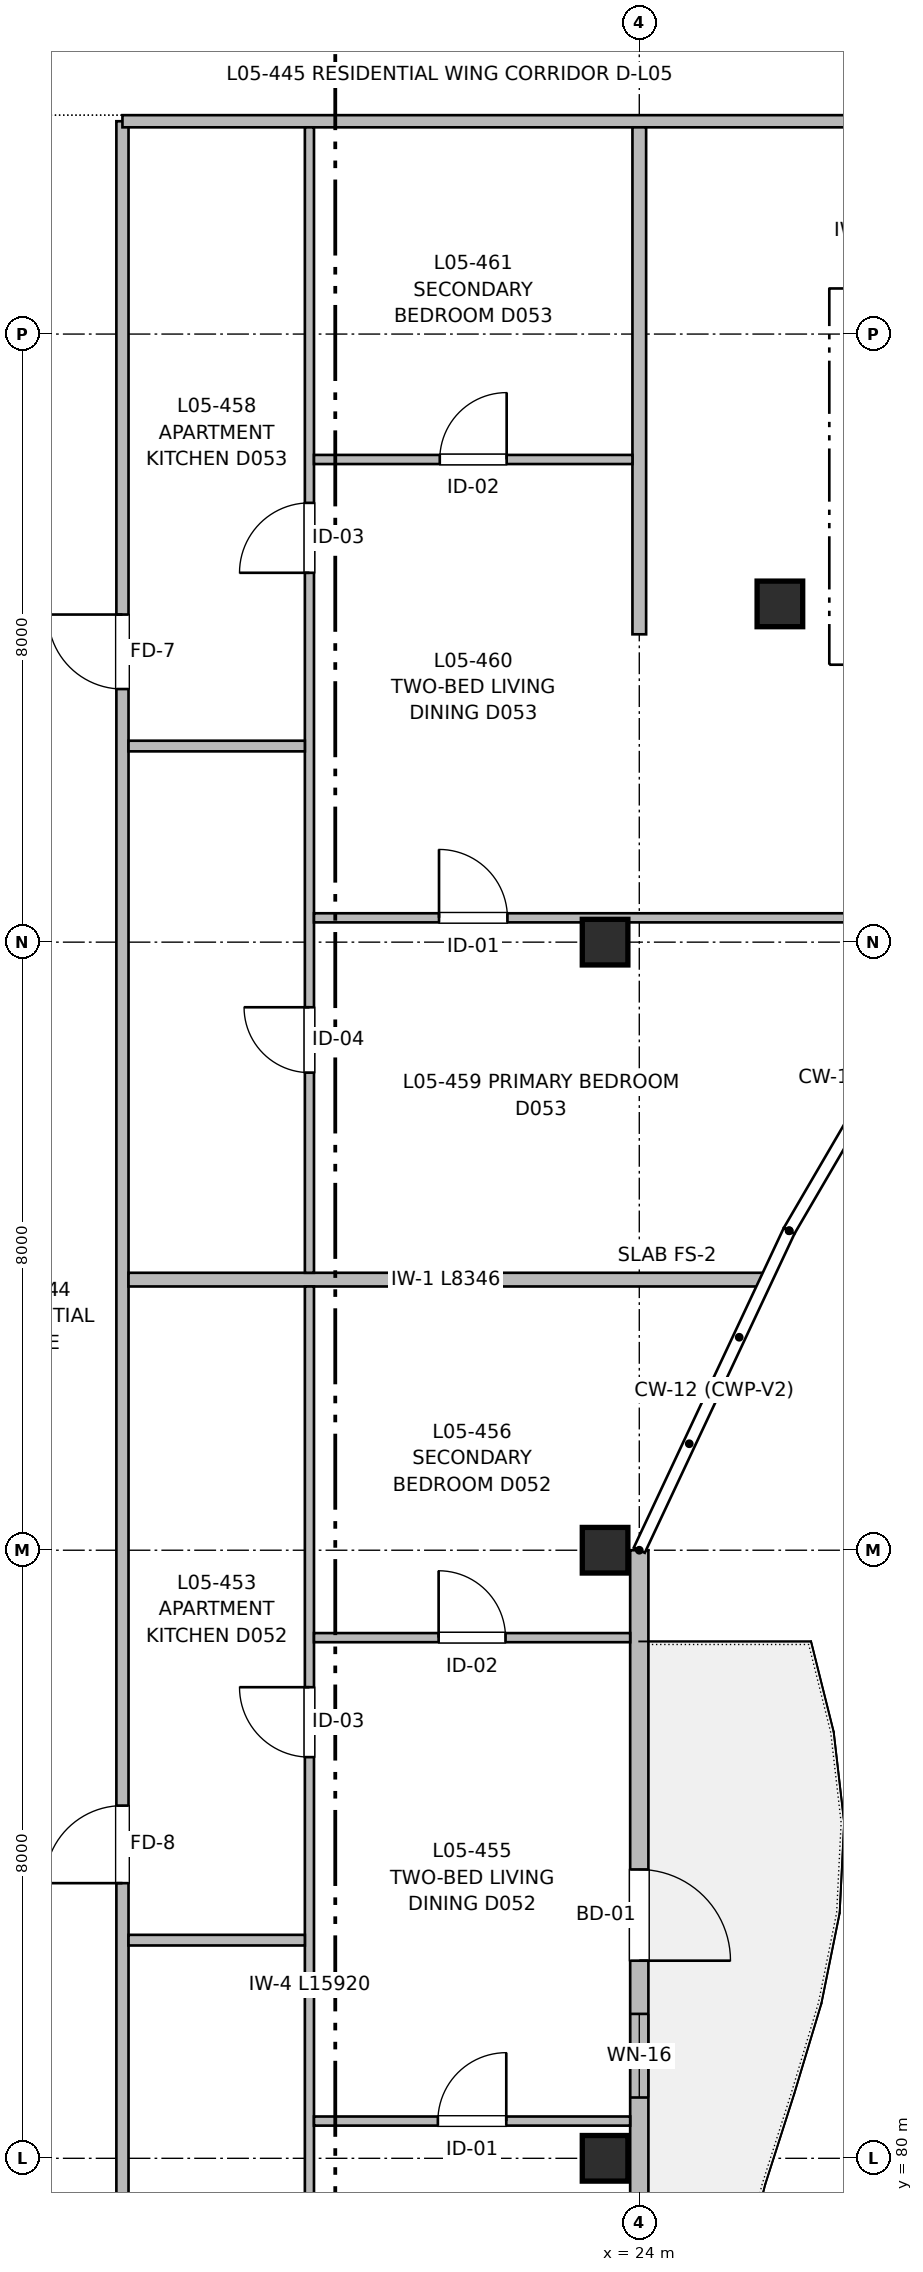
"""IFC4 building model, lengths in metres.
Left out: names, types, materials, properties, quantities, classifications, styles, units other than length and angle.
Written with IfcOpenShell. Run it as: python <this file> out.ifc"""

import sys

from ifc_helpers import new_model, si_unit, direction, frame, frame_2d, origin, origin_2d, place, context, subcontext, project, spatial, rectangle, extrude, element, fill, save


model = new_model("IFC4")
c1 = context("Model", 3, precision=1e-05, world=origin(), true_north=direction((0.0, 1.0)))
c2 = subcontext(c1, "Body", "Model", "MODEL_VIEW")
j1 = project(units=[si_unit("LENGTHUNIT", "METRE"), si_unit("PLANEANGLEUNIT", "RADIAN")], contexts=[c1])
p1 = place(None, origin())
s1 = spatial("IfcSite", under=j1, at=p1, CompositionType="ELEMENT")
p2 = place(p1, origin())
s2 = spatial("IfcBuilding", under=s1, at=p2, CompositionType="ELEMENT")
p3 = place(p2, frame((0.0, 0.0, 16.96)))
s3 = spatial("IfcBuildingStorey", under=s2, at=p3, CompositionType="ELEMENT", Elevation=16.96)
for number, where, z_axis, x_axis in (
    (1, (23.55, 80.0, 0.0), (0.0, 0.0, 1.0), (1.0, 0.0, 0.0)),
    (2, (23.55, 88.0, 0.0), (0.0, 0.0, 1.0), (1.0, 0.0, 0.0)),
    (3, (23.55, 96.0, 0.0), (0.0, 0.0, 1.0), (1.0, 0.0, 0.0)),
    (4, (25.85, 100.45, 0.0), (0.0, 0.0, 1.0), (1.0, 0.0, 0.0)),
):
    element("IfcColumn", number, at=place(p3, frame(where, z_axis=z_axis, x_axis=x_axis)), inside=s3, PredefinedType="COLUMN", context=c2, shape_type="SweptSolid", body=[
        extrude(rectangle(XDim=0.6, YDim=0.6, at=origin_2d()), origin(), (0.0, 0.0, 1.0), 3.2),
    ])
p4 = place(p3, frame((24.0, 88.0, 0.0), z_axis=(0.0, 0.0, 1.0), x_axis=(0.0, -1.0, 0.0)))
e5 = element("IfcWall", 5, at=p4, inside=s3, PredefinedType="SOLIDWALL", context=c2, shape_type="SweptSolid", body=[
    extrude(rectangle(XDim=28.8, YDim=0.24, at=frame_2d((14.4, 0.0))), origin(), (0.0, 0.0, 1.0), 2.98),
])
p5 = place(p4, frame((4.2, 0.0, 0.0)))
e6 = element("IfcOpeningElement", 6, at=p5, cuts=e5, PredefinedType="OPENING", context=c2, shape_type="SweptSolid", body=[
    extrude(rectangle(XDim=1.2, YDim=2.2, at=frame_2d((0.6, 1.1))), frame((0.0, 0.13, 0.0), z_axis=(0.0, -1.0, 0.0), x_axis=(1.0, 0.0, 0.0)), (0.0, 0.0, 1.0), 0.26),
])
p6 = place(p4, frame((6.1, 0.0, 0.62)))
e7 = element("IfcOpeningElement", 7, at=p6, cuts=e5, PredefinedType="OPENING", context=c2, shape_type="SweptSolid", body=[
    extrude(rectangle(XDim=1.1, YDim=1.6, at=frame_2d((0.55, 0.8))), frame((0.0, 0.13, 0.0), z_axis=(0.0, -1.0, 0.0), x_axis=(1.0, 0.0, 0.0)), (0.0, 0.0, 1.0), 0.26),
])
p7 = place(p4, frame((13.275, 0.0, 0.72)))
e8 = element("IfcOpeningElement", 8, at=p7, cuts=e5, PredefinedType="OPENING", context=c2, shape_type="SweptSolid", body=[
    extrude(rectangle(XDim=2.25, YDim=1.5, at=frame_2d((1.125, 0.75))), frame((0.0, 0.13, 0.0), z_axis=(0.0, -1.0, 0.0), x_axis=(1.0, 0.0, 0.0)), (0.0, 0.0, 1.0), 0.26),
])
p8 = place(p4, frame((24.775, 0.0, 0.9)))
e9 = element("IfcOpeningElement", 9, at=p8, cuts=e5, PredefinedType="OPENING", context=c2, shape_type="SweptSolid", body=[
    extrude(rectangle(XDim=1.05, YDim=1.15, at=frame_2d((0.525, 0.575))), frame((0.0, 0.13, 0.0), z_axis=(0.0, -1.0, 0.0), x_axis=(1.0, 0.0, 0.0)), (0.0, 0.0, 1.0), 0.26),
])
p9 = place(p4, frame((19.725, 0.0, 0.82)))
e10 = element("IfcOpeningElement", 10, at=p9, cuts=e5, PredefinedType="OPENING", context=c2, shape_type="SweptSolid", body=[
    extrude(rectangle(XDim=1.5, YDim=1.4, at=frame_2d((0.75, 0.7))), frame((0.0, 0.13, 0.0), z_axis=(0.0, -1.0, 0.0), x_axis=(1.0, 0.0, 0.0)), (0.0, 0.0, 1.0), 0.26),
])
p10 = place(p4, frame((9.255, 0.0, 0.82)))
e11 = element("IfcOpeningElement", 11, at=p10, cuts=e5, PredefinedType="OPENING", context=c2, shape_type="SweptSolid", body=[
    extrude(rectangle(XDim=1.5, YDim=1.4, at=frame_2d((0.75, 0.7))), frame((0.0, 0.13, 0.0), z_axis=(0.0, -1.0, 0.0), x_axis=(1.0, 0.0, 0.0)), (0.0, 0.0, 1.0), 0.26),
])
p11 = place(p3, frame((17.2, 59.36, 0.0), z_axis=(0.0, 0.0, 1.0), x_axis=(0.0, 1.0, 0.0)))
e12 = element("IfcWall", 12, at=p11, inside=s3, PredefinedType="PARTITIONING", context=c2, shape_type="SweptSolid", body=[
    extrude(rectangle(XDim=47.44, YDim=0.16, at=frame_2d((23.72, 0.0))), origin(), (0.0, 0.0, 1.0), 2.935),
])
p12 = place(p11, frame((8.11, 0.0, 0.0)))
e13 = element("IfcOpeningElement", 13, at=p12, cuts=e12, PredefinedType="OPENING", context=c2, shape_type="SweptSolid", body=[
    extrude(rectangle(XDim=0.98, YDim=2.15, at=frame_2d((0.49, 1.075))), frame((0.0, 0.09, 0.0), z_axis=(0.0, -1.0, 0.0), x_axis=(1.0, 0.0, 0.0)), (0.0, 0.0, 1.0), 0.18),
])
p13 = place(p11, frame((24.26, 0.0, 0.0)))
e14 = element("IfcOpeningElement", 14, at=p13, cuts=e12, PredefinedType="OPENING", context=c2, shape_type="SweptSolid", body=[
    extrude(rectangle(XDim=1.02, YDim=2.15, at=frame_2d((0.51, 1.075))), frame((0.0, 0.09, 0.0), z_axis=(0.0, -1.0, 0.0), x_axis=(1.0, 0.0, 0.0)), (0.0, 0.0, 1.0), 0.18),
])
p14 = place(p11, frame((39.97, 0.0, 0.0)))
e15 = element("IfcOpeningElement", 15, at=p14, cuts=e12, PredefinedType="OPENING", context=c2, shape_type="SweptSolid", body=[
    extrude(rectangle(XDim=0.98, YDim=2.15, at=frame_2d((0.49, 1.075))), frame((0.0, 0.09, 0.0), z_axis=(0.0, -1.0, 0.0), x_axis=(1.0, 0.0, 0.0)), (0.0, 0.0, 1.0), 0.18),
])
p15 = place(p3, frame((17.2, 106.8, 0.0), z_axis=(0.0, 0.0, 1.0), x_axis=(1.0, 0.0, 0.0)))
e16 = element("IfcWall", 16, at=p15, inside=s3, PredefinedType="PARTITIONING", context=c2, shape_type="SweptSolid", body=[
    extrude(rectangle(XDim=17.64, YDim=0.16, at=frame_2d((8.82, 0.0))), origin(), (0.0, 0.0, 1.0), 2.935),
])
p16 = place(p15, frame((13.075, 0.0, 0.0)))
e17 = element("IfcOpeningElement", 17, at=p16, cuts=e16, PredefinedType="OPENING", context=c2, shape_type="SweptSolid", body=[
    extrude(rectangle(XDim=1.05, YDim=2.15, at=frame_2d((0.525, 1.075))), frame((0.0, 0.09, 0.0), z_axis=(0.0, -1.0, 0.0), x_axis=(1.0, 0.0, 0.0)), (0.0, 0.0, 1.0), 0.18),
])
p17 = place(p3, frame((24.0, 100.05, 0.0), z_axis=(0.0, 0.0, 1.0), x_axis=(0.0, 1.0, 0.0)))
e18 = element("IfcWall", 18, at=p17, inside=s3, PredefinedType="PARTITIONING", context=c2, shape_type="SweptSolid", body=[
    extrude(rectangle(XDim=6.67, YDim=0.18, at=frame_2d((3.335, 0.0))), origin(), (0.0, 0.0, 1.0), 2.935),
])
p18 = place(p3, frame((17.28, 91.56, 0.0), z_axis=(0.0, 0.0, 1.0), x_axis=(1.0, 0.0, 0.0)))
e19 = element("IfcWall", 19, at=p18, inside=s3, PredefinedType="PARTITIONING", context=c2, shape_type="SweptSolid", body=[
    extrude(rectangle(XDim=8.346, YDim=0.18, at=frame_2d((4.173, 0.0))), origin(), (0.0, 0.0, 1.0), 2.935),
])
p19 = place(p3, frame((19.66, 75.55, 0.0), z_axis=(0.0, 0.0, 1.0), x_axis=(0.0, 1.0, 0.0)))
e20 = element("IfcWall", 20, at=p19, inside=s3, PredefinedType="PARTITIONING", context=c2, shape_type="SweptSolid", body=[
    extrude(rectangle(XDim=15.92, YDim=0.12, at=frame_2d((7.96, 0.0))), origin(), (0.0, 0.0, 1.0), 2.935),
])
p20 = place(p19, frame((2.781, 0.0, 0.0)))
e21 = element("IfcOpeningElement", 21, at=p20, cuts=e20, PredefinedType="OPENING", context=c2, shape_type="SweptSolid", body=[
    extrude(rectangle(XDim=0.94, YDim=2.1, at=frame_2d((0.47, 1.05))), frame((0.0, 0.07, 0.0), z_axis=(0.0, -1.0, 0.0), x_axis=(1.0, 0.0, 0.0)), (0.0, 0.0, 1.0), 0.14),
])
p21 = place(p19, frame((9.728, 0.0, 0.0)))
e22 = element("IfcOpeningElement", 22, at=p21, cuts=e20, PredefinedType="OPENING", context=c2, shape_type="SweptSolid", body=[
    extrude(rectangle(XDim=0.92, YDim=2.1, at=frame_2d((0.46, 1.05))), frame((0.0, 0.07, 0.0), z_axis=(0.0, -1.0, 0.0), x_axis=(1.0, 0.0, 0.0)), (0.0, 0.0, 1.0), 0.14),
])
p22 = place(p3, frame((17.28, 82.87, 0.0), z_axis=(0.0, 0.0, 1.0), x_axis=(1.0, 0.0, 0.0)))
e23 = element("IfcWall", 23, at=p22, inside=s3, PredefinedType="PARTITIONING", context=c2, shape_type="SweptSolid", body=[
    extrude(rectangle(XDim=2.32, YDim=0.14, at=frame_2d((1.16, 0.0))), origin(), (0.0, 0.0, 1.0), 2.935),
])
p23 = place(p3, frame((19.72, 80.49, 0.0), z_axis=(0.0, 0.0, 1.0), x_axis=(1.0, 0.0, 0.0)))
e24 = element("IfcWall", 24, at=p23, inside=s3, PredefinedType="PARTITIONING", context=c2, shape_type="SweptSolid", body=[
    extrude(rectangle(XDim=4.16, YDim=0.12, at=frame_2d((2.08, 0.0))), origin(), (0.0, 0.0, 1.0), 2.935),
])
p24 = place(p23, frame((1.63, 0.0, 0.0)))
e25 = element("IfcOpeningElement", 25, at=p24, cuts=e24, PredefinedType="OPENING", context=c2, shape_type="SweptSolid", body=[
    extrude(rectangle(XDim=0.9, YDim=2.1, at=frame_2d((0.45, 1.05))), frame((0.0, 0.07, 0.0), z_axis=(0.0, -1.0, 0.0), x_axis=(1.0, 0.0, 0.0)), (0.0, 0.0, 1.0), 0.14),
])
p25 = place(p3, frame((19.72, 86.85, 0.0), z_axis=(0.0, 0.0, 1.0), x_axis=(1.0, 0.0, 0.0)))
e26 = element("IfcWall", 26, at=p25, inside=s3, PredefinedType="PARTITIONING", context=c2, shape_type="SweptSolid", body=[
    extrude(rectangle(XDim=4.16, YDim=0.12, at=frame_2d((2.08, 0.0))), origin(), (0.0, 0.0, 1.0), 2.935),
])
p26 = place(p25, frame((1.64, 0.0, 0.0)))
e27 = element("IfcOpeningElement", 27, at=p26, cuts=e26, PredefinedType="OPENING", context=c2, shape_type="SweptSolid", body=[
    extrude(rectangle(XDim=0.88, YDim=2.1, at=frame_2d((0.44, 1.05))), frame((0.0, 0.07, 0.0), z_axis=(0.0, -1.0, 0.0), x_axis=(1.0, 0.0, 0.0)), (0.0, 0.0, 1.0), 0.14),
])
p27 = place(p3, frame((19.66, 91.65, 0.0), z_axis=(0.0, 0.0, 1.0), x_axis=(0.0, 1.0, 0.0)))
e28 = element("IfcWall", 28, at=p27, inside=s3, PredefinedType="PARTITIONING", context=c2, shape_type="SweptSolid", body=[
    extrude(rectangle(XDim=15.07, YDim=0.12, at=frame_2d((7.535, 0.0))), origin(), (0.0, 0.0, 1.0), 2.935),
])
p28 = place(p27, frame((2.633, 0.0, 0.0)))
e29 = element("IfcOpeningElement", 29, at=p28, cuts=e28, PredefinedType="OPENING", context=c2, shape_type="SweptSolid", body=[
    extrude(rectangle(XDim=0.86, YDim=2.1, at=frame_2d((0.43, 1.05))), frame((0.0, 0.07, 0.0), z_axis=(0.0, -1.0, 0.0), x_axis=(1.0, 0.0, 0.0)), (0.0, 0.0, 1.0), 0.14),
])
p29 = place(p27, frame((9.209, 0.0, 0.0)))
e30 = element("IfcOpeningElement", 30, at=p29, cuts=e28, PredefinedType="OPENING", context=c2, shape_type="SweptSolid", body=[
    extrude(rectangle(XDim=0.92, YDim=2.1, at=frame_2d((0.46, 1.05))), frame((0.0, 0.07, 0.0), z_axis=(0.0, -1.0, 0.0), x_axis=(1.0, 0.0, 0.0)), (0.0, 0.0, 1.0), 0.14),
])
p30 = place(p3, frame((17.28, 98.58, 0.0), z_axis=(0.0, 0.0, 1.0), x_axis=(1.0, 0.0, 0.0)))
e31 = element("IfcWall", 31, at=p30, inside=s3, PredefinedType="PARTITIONING", context=c2, shape_type="SweptSolid", body=[
    extrude(rectangle(XDim=2.32, YDim=0.14, at=frame_2d((1.16, 0.0))), origin(), (0.0, 0.0, 1.0), 2.935),
])
p31 = place(p3, frame((19.72, 96.32, 0.0), z_axis=(0.0, 0.0, 1.0), x_axis=(1.0, 0.0, 0.0)))
e32 = element("IfcWall", 32, at=p31, inside=s3, PredefinedType="PARTITIONING", context=c2, shape_type="SweptSolid", body=[
    extrude(rectangle(XDim=8.618, YDim=0.12, at=frame_2d((4.309, 0.0))), origin(), (0.0, 0.0, 1.0), 2.935),
])
p32 = place(p31, frame((1.645, 0.0, 0.0)))
e33 = element("IfcOpeningElement", 33, at=p32, cuts=e32, PredefinedType="OPENING", context=c2, shape_type="SweptSolid", body=[
    extrude(rectangle(XDim=0.9, YDim=2.1, at=frame_2d((0.45, 1.05))), frame((0.0, 0.07, 0.0), z_axis=(0.0, -1.0, 0.0), x_axis=(1.0, 0.0, 0.0)), (0.0, 0.0, 1.0), 0.14),
])
p33 = place(p3, frame((19.72, 102.35, 0.0), z_axis=(0.0, 0.0, 1.0), x_axis=(1.0, 0.0, 0.0)))
e34 = element("IfcWall", 34, at=p33, inside=s3, PredefinedType="PARTITIONING", context=c2, shape_type="SweptSolid", body=[
    extrude(rectangle(XDim=4.19, YDim=0.12, at=frame_2d((2.095, 0.0))), origin(), (0.0, 0.0, 1.0), 2.935),
])
p34 = place(p33, frame((1.655, 0.0, 0.0)))
e35 = element("IfcOpeningElement", 35, at=p34, cuts=e34, PredefinedType="OPENING", context=c2, shape_type="SweptSolid", body=[
    extrude(rectangle(XDim=0.88, YDim=2.1, at=frame_2d((0.44, 1.05))), frame((0.0, 0.07, 0.0), z_axis=(0.0, -1.0, 0.0), x_axis=(1.0, 0.0, 0.0)), (0.0, 0.0, 1.0), 0.14),
])
p35 = place(p5, origin())
e36 = element("IfcDoor", 36, at=p35, inside=s3, OperationType="SINGLE_SWING_RIGHT", PredefinedType="DOOR", context=c2, shape_type="SweptSolid", body=[
    extrude(rectangle(XDim=1.2, YDim=2.2, at=frame_2d((0.6, 1.1))), frame((0.0, 0.025, 0.0), z_axis=(0.0, -1.0, 0.0), x_axis=(1.0, 0.0, 0.0)), (0.0, 0.0, 1.0), 0.05),
])
fill(e6, e36)
p36 = place(p6, origin())
e37 = element("IfcWindow", 37, at=p36, inside=s3, PartitioningType="SINGLE_PANEL", PredefinedType="WINDOW", context=c2, shape_type="SweptSolid", body=[
    extrude(rectangle(XDim=1.1, YDim=1.6, at=frame_2d((0.55, 0.8))), frame((0.0, 0.03, 0.0), z_axis=(0.0, -1.0, 0.0), x_axis=(1.0, 0.0, 0.0)), (0.0, 0.0, 1.0), 0.06),
])
fill(e7, e37)
p37 = place(p21, origin())
e38 = element("IfcDoor", 38, at=p37, inside=s3, OperationType="SINGLE_SWING_RIGHT", PredefinedType="DOOR", context=c2, shape_type="SweptSolid", body=[
    extrude(rectangle(XDim=0.92, YDim=2.1, at=frame_2d((0.46, 1.05))), frame((0.0, 0.025, 0.0), z_axis=(0.0, -1.0, 0.0), x_axis=(1.0, 0.0, 0.0)), (0.0, 0.0, 1.0), 0.05),
])
fill(e22, e38)
p38 = place(p13, origin())
e39 = element("IfcDoor", 39, at=p38, inside=s3, OperationType="SINGLE_SWING_LEFT", PredefinedType="DOOR", context=c2, shape_type="SweptSolid", body=[
    extrude(rectangle(XDim=1.02, YDim=2.15, at=frame_2d((0.51, 1.075))), frame((0.0, 0.025, 0.0), z_axis=(0.0, -1.0, 0.0), x_axis=(1.0, 0.0, 0.0)), (0.0, 0.0, 1.0), 0.05),
])
fill(e14, e39)
p39 = place(p24, origin())
e40 = element("IfcDoor", 40, at=p39, inside=s3, OperationType="SINGLE_SWING_RIGHT", PredefinedType="DOOR", context=c2, shape_type="SweptSolid", body=[
    extrude(rectangle(XDim=0.9, YDim=2.1, at=frame_2d((0.45, 1.05))), frame((0.0, 0.025, 0.0), z_axis=(0.0, -1.0, 0.0), x_axis=(1.0, 0.0, 0.0)), (0.0, 0.0, 1.0), 0.05),
])
fill(e25, e40)
p40 = place(p26, origin())
e41 = element("IfcDoor", 41, at=p40, inside=s3, OperationType="SINGLE_SWING_LEFT", PredefinedType="DOOR", context=c2, shape_type="SweptSolid", body=[
    extrude(rectangle(XDim=0.88, YDim=2.1, at=frame_2d((0.44, 1.05))), frame((0.0, 0.025, 0.0), z_axis=(0.0, -1.0, 0.0), x_axis=(1.0, 0.0, 0.0)), (0.0, 0.0, 1.0), 0.05),
])
fill(e27, e41)
p41 = place(p28, origin())
e42 = element("IfcDoor", 42, at=p41, inside=s3, OperationType="SINGLE_SWING_RIGHT", PredefinedType="DOOR", context=c2, shape_type="SweptSolid", body=[
    extrude(rectangle(XDim=0.86, YDim=2.1, at=frame_2d((0.43, 1.05))), frame((0.0, 0.025, 0.0), z_axis=(0.0, -1.0, 0.0), x_axis=(1.0, 0.0, 0.0)), (0.0, 0.0, 1.0), 0.05),
])
fill(e29, e42)
p42 = place(p29, origin())
e43 = element("IfcDoor", 43, at=p42, inside=s3, OperationType="SINGLE_SWING_LEFT", PredefinedType="DOOR", context=c2, shape_type="SweptSolid", body=[
    extrude(rectangle(XDim=0.92, YDim=2.1, at=frame_2d((0.46, 1.05))), frame((0.0, 0.025, 0.0), z_axis=(0.0, -1.0, 0.0), x_axis=(1.0, 0.0, 0.0)), (0.0, 0.0, 1.0), 0.05),
])
fill(e30, e43)
p43 = place(p14, origin())
e44 = element("IfcDoor", 44, at=p43, inside=s3, OperationType="SINGLE_SWING_RIGHT", PredefinedType="DOOR", context=c2, shape_type="SweptSolid", body=[
    extrude(rectangle(XDim=0.98, YDim=2.15, at=frame_2d((0.49, 1.075))), frame((0.0, 0.025, 0.0), z_axis=(0.0, -1.0, 0.0), x_axis=(1.0, 0.0, 0.0)), (0.0, 0.0, 1.0), 0.05),
])
fill(e15, e44)
p44 = place(p32, origin())
e45 = element("IfcDoor", 45, at=p44, inside=s3, OperationType="SINGLE_SWING_LEFT", PredefinedType="DOOR", context=c2, shape_type="SweptSolid", body=[
    extrude(rectangle(XDim=0.9, YDim=2.1, at=frame_2d((0.45, 1.05))), frame((0.0, 0.025, 0.0), z_axis=(0.0, -1.0, 0.0), x_axis=(1.0, 0.0, 0.0)), (0.0, 0.0, 1.0), 0.05),
])
fill(e33, e45)
p45 = place(p34, origin())
e46 = element("IfcDoor", 46, at=p45, inside=s3, OperationType="SINGLE_SWING_RIGHT", PredefinedType="DOOR", context=c2, shape_type="SweptSolid", body=[
    extrude(rectangle(XDim=0.88, YDim=2.1, at=frame_2d((0.44, 1.05))), frame((0.0, 0.025, 0.0), z_axis=(0.0, -1.0, 0.0), x_axis=(1.0, 0.0, 0.0)), (0.0, 0.0, 1.0), 0.05),
])
fill(e35, e46)
save(model, sys.argv[1])
